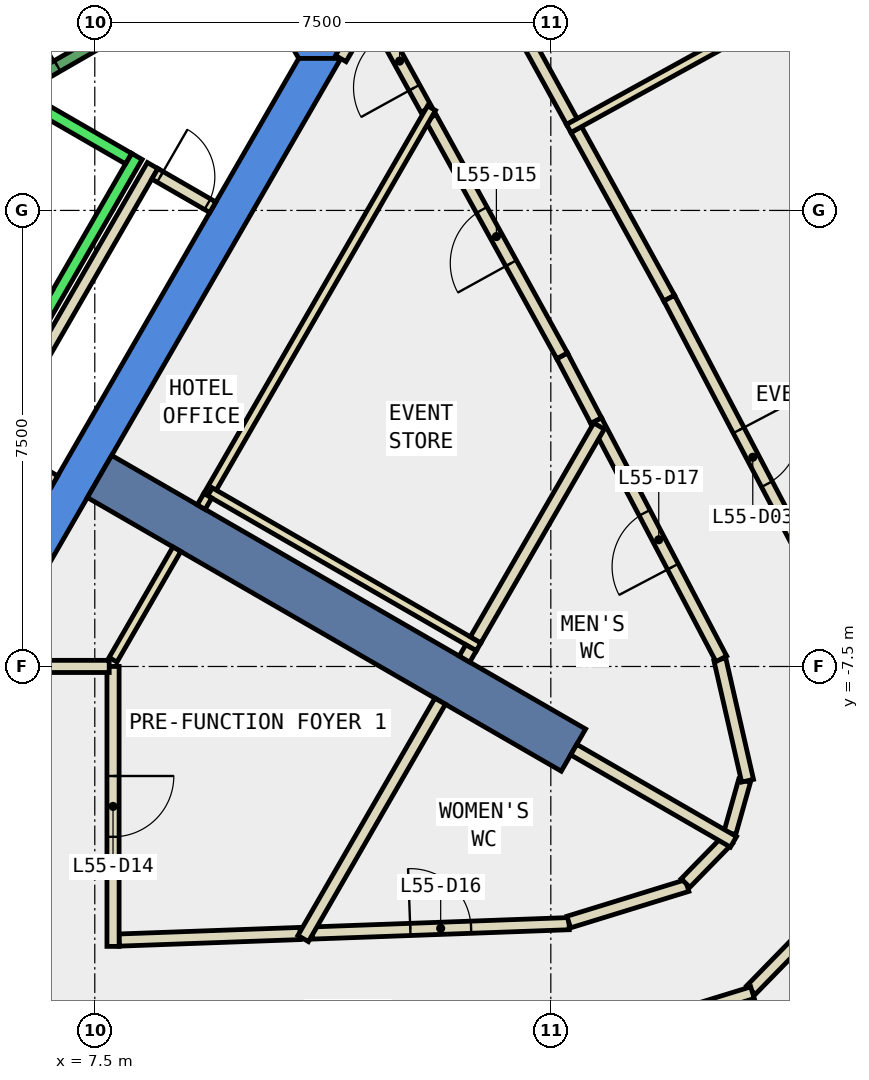
"""IFC4 building model, lengths in metres.
Left out: names, types, materials, properties, quantities, classifications, styles, units other than length and angle.
Written with IfcOpenShell. Run it as: python <this file> out.ifc"""

import sys

from ifc_helpers import new_model, si_unit, direction, frame, frame_2d, origin, place, context, subcontext, project, spatial, polyline, rectangle, outline, extrude, element, fill, save


model = new_model("IFC4")
c1 = context("Model", 3, precision=1e-05, world=origin(), true_north=direction((0.0, 1.0)))
c2 = subcontext(c1, "Body", "Model", "MODEL_VIEW")
j1 = project(units=[si_unit("LENGTHUNIT", "METRE"), si_unit("PLANEANGLEUNIT", "RADIAN")], contexts=[c1])
p1 = place(None, origin())
s1 = spatial("IfcSite", under=j1, at=p1, CompositionType="ELEMENT")
p2 = place(p1, origin())
s2 = spatial("IfcBuilding", under=s1, at=p2, CompositionType="ELEMENT")
p3 = place(p2, frame((0.0, 0.0, 245.0)))
s3 = spatial("IfcBuildingStorey", under=s2, at=p3, CompositionType="ELEMENT", Elevation=245.0)
p4 = place(p3, frame((0.0, 0.0, -0.34)))
e1 = element("IfcWall", 1, at=p4, inside=s3, PredefinedType="SHEAR", context=c2, shape_type="SweptSolid", body=[
    extrude(outline(polyline([(6.786, 10.747), (6.266, 10.447), (10.854, 2.5), (11.547, 2.5), (6.786, 10.747)])), origin(), (0.0, 0.0, 1.0), 3.6),
])
p5 = place(p3, frame((0.0, 0.0, -0.34)))
e2 = element("IfcWall", 2, at=p5, inside=s3, PredefinedType="SHEAR", context=c2, shape_type="SweptSolid", body=[
    extrude(outline(polyline([(5.774, -7.5), (11.547, 2.5), (10.854, 2.5), (5.427, -6.9), (5.774, -7.5)])), origin(), (0.0, 0.0, 1.0), 3.6),
])
p6 = place(p3, frame((7.578, -4.375, -0.34), z_axis=(0.0, 0.0, 1.0), x_axis=(0.866024315419, -0.5000018851, 0.0)))
e3 = element("IfcWall", 3, at=p6, inside=s3, PredefinedType="SHEAR", context=c2, shape_type="SweptSolid", body=[
    extrude(rectangle(XDim=9.0, YDim=0.8, at=frame_2d((4.5, 0.0))), origin(), (0.0, 0.0, 1.0), 3.6),
])
p7 = place(p3, frame((21.505, 1.577, 0.0), z_axis=(0.0, 0.0, 1.0), x_axis=(-0.482734585173, 0.875766704253, 0.0)))
e4 = element("IfcWall", 4, at=p7, inside=s3, PredefinedType="STANDARD", context=c2, shape_type="SweptSolid", body=[
    extrude(rectangle(XDim=5.593, YDim=0.3, at=frame_2d((2.796, 0.0))), origin(), (0.0, 0.0, 1.0), 3.26),
])
p8 = place(p7, frame((0.698, 0.0, 0.9)))
e5 = element("IfcOpeningElement", 5, at=p8, cuts=e4, PredefinedType="OPENING", context=c2, shape_type="SweptSolid", body=[
    extrude(rectangle(XDim=1.4, YDim=2.0, at=frame_2d((0.7, 1.0))), frame((0.0, 0.16, 0.0), z_axis=(0.0, -1.0, 0.0), x_axis=(1.0, 0.0, 0.0)), (0.0, 0.0, 1.0), 0.32),
])
p9 = place(p7, frame((3.495, 0.0, 0.9)))
e6 = element("IfcOpeningElement", 6, at=p9, cuts=e4, PredefinedType="OPENING", context=c2, shape_type="SweptSolid", body=[
    extrude(rectangle(XDim=1.4, YDim=2.0, at=frame_2d((0.7, 1.0))), frame((0.0, 0.16, 0.0), z_axis=(0.0, -1.0, 0.0), x_axis=(1.0, 0.0, 0.0)), (0.0, 0.0, 1.0), 0.32),
])
p10 = place(p3, frame((12.952, 1.661, 0.0), z_axis=(0.0, 0.0, 1.0), x_axis=(-0.482707835392, 0.875781448566, 0.0)))
e7 = element("IfcWall", 7, at=p10, inside=s3, PredefinedType="PARTITIONING", context=c2, shape_type="SweptSolid", body=[
    extrude(rectangle(XDim=1.817, YDim=0.2, at=frame_2d((0.908, 0.0))), origin(), (0.0, 0.0, 1.0), 3.26),
])
p11 = place(p10, frame((0.408, 0.0, 0.0)))
e8 = element("IfcOpeningElement", 8, at=p11, cuts=e7, PredefinedType="OPENING", context=c2, shape_type="SweptSolid", body=[
    extrude(rectangle(XDim=1.0, YDim=2.1, at=frame_2d((0.5, 1.05))), frame((0.0, 0.11, 0.0), z_axis=(0.0, -1.0, 0.0), x_axis=(1.0, 0.0, 0.0)), (0.0, 0.0, 1.0), 0.22),
])
p12 = place(p3, frame((12.079, 3.419, 0.0), z_axis=(0.0, 0.0, 1.0), x_axis=(-0.500674759037, -0.865635480825, 0.0)))
e9 = element("IfcWall", 9, at=p12, inside=s3, PredefinedType="PARTITIONING", context=c2, shape_type="SweptSolid", body=[
    extrude(rectangle(XDim=1.065, YDim=0.2, at=frame_2d((0.532, 0.0))), origin(), (0.0, 0.0, 1.0), 3.26),
])
p13 = place(p3, frame((7.9, -11.999, 0.0), z_axis=(0.0, 0.0, 1.0), x_axis=(0.999343711998, 0.036223546064, 0.0)))
e10 = element("IfcWall", 10, at=p13, inside=s3, PredefinedType="PARTITIONING", context=c2, shape_type="SweptSolid", body=[
    extrude(rectangle(XDim=2.979, YDim=0.2, at=frame_2d((1.49, 0.0))), origin(), (0.0, 0.0, 1.0), 3.26),
])
p14 = place(p3, frame((15.746, -3.458, 0.0), z_axis=(0.0, 0.0, 1.0), x_axis=(-0.464794189951, 0.885418748948, 0.0)))
e11 = element("IfcWall", 11, at=p14, inside=s3, PredefinedType="PARTITIONING", context=c2, shape_type="SweptSolid", body=[
    extrude(rectangle(XDim=1.205, YDim=0.2, at=frame_2d((0.603, 0.0))), origin(), (0.0, 0.0, 1.0), 3.26),
])
p15 = place(p3, frame((15.186, -2.391, 0.0), z_axis=(0.0, 0.0, 1.0), x_axis=(-0.482858240592, 0.875698532311, 0.0)))
e12 = element("IfcWall", 12, at=p15, inside=s3, PredefinedType="PARTITIONING", context=c2, shape_type="SweptSolid", body=[
    extrude(rectangle(XDim=4.478, YDim=0.2, at=frame_2d((2.239, 0.0))), origin(), (0.0, 0.0, 1.0), 3.26),
])
p16 = place(p15, frame((1.739, 0.0, 0.0)))
e13 = element("IfcOpeningElement", 13, at=p16, cuts=e12, PredefinedType="OPENING", context=c2, shape_type="SweptSolid", body=[
    extrude(rectangle(XDim=1.0, YDim=2.1, at=frame_2d((0.5, 1.05))), frame((0.0, 0.11, 0.0), z_axis=(0.0, -1.0, 0.0), x_axis=(1.0, 0.0, 0.0)), (0.0, 0.0, 1.0), 0.22),
])
p17 = place(p3, frame((11.077, -11.883, 0.0), z_axis=(0.0, 0.0, 1.0), x_axis=(0.999335333519, 0.036453959732, 0.0)))
e14 = element("IfcWall", 14, at=p17, inside=s3, PredefinedType="PARTITIONING", context=c2, shape_type="SweptSolid", body=[
    extrude(rectangle(XDim=4.226, YDim=0.2, at=frame_2d((2.113, 0.0))), origin(), (0.0, 0.0, 1.0), 3.26),
])
p18 = place(p17, frame((1.613, 0.0, 0.0)))
e15 = element("IfcOpeningElement", 15, at=p18, cuts=e14, PredefinedType="OPENING", context=c2, shape_type="SweptSolid", body=[
    extrude(rectangle(XDim=1.0, YDim=2.1, at=frame_2d((0.5, 1.05))), frame((0.0, 0.11, 0.0), z_axis=(0.0, -1.0, 0.0), x_axis=(1.0, 0.0, 0.0)), (0.0, 0.0, 1.0), 0.22),
])
p19 = place(p3, frame((15.295, -11.703, 0.0), z_axis=(0.0, 0.0, 1.0), x_axis=(0.95563113363, 0.294566013716, 0.0)))
e16 = element("IfcWall", 16, at=p19, inside=s3, PredefinedType="PARTITIONING", context=c2, shape_type="SweptSolid", body=[
    extrude(rectangle(XDim=2.036, YDim=0.2, at=frame_2d((1.018, 0.0))), origin(), (0.0, 0.0, 1.0), 3.26),
])
p20 = place(p3, frame((17.215, -11.061, 0.0), z_axis=(0.0, 0.0, 1.0), x_axis=(0.698527813511, 0.715582904877, 0.0)))
e17 = element("IfcWall", 17, at=p20, inside=s3, PredefinedType="PARTITIONING", context=c2, shape_type="SweptSolid", body=[
    extrude(rectangle(XDim=1.002, YDim=0.2, at=frame_2d((0.501, 0.0))), origin(), (0.0, 0.0, 1.0), 3.26),
])
p21 = place(p3, frame((17.945, -10.238, 0.0), z_axis=(0.0, 0.0, 1.0), x_axis=(0.270785141481, 0.962639811743, 0.0)))
e18 = element("IfcWall", 18, at=p21, inside=s3, PredefinedType="PARTITIONING", context=c2, shape_type="SweptSolid", body=[
    extrude(rectangle(XDim=0.894, YDim=0.2, at=frame_2d((0.447, 0.0))), origin(), (0.0, 0.0, 1.0), 3.26),
])
p22 = place(p3, frame((18.236, -9.379, 0.0), z_axis=(0.0, 0.0, 1.0), x_axis=(-0.222760041204, 0.974873306662, 0.0)))
e19 = element("IfcWall", 19, at=p22, inside=s3, PredefinedType="PARTITIONING", context=c2, shape_type="SweptSolid", body=[
    extrude(rectangle(XDim=2.047, YDim=0.2, at=frame_2d((1.024, 0.0))), origin(), (0.0, 0.0, 1.0), 3.26),
])
p23 = place(p3, frame((17.804, -7.374, 0.0), z_axis=(0.0, 0.0, 1.0), x_axis=(-0.465179971699, 0.885216128372, 0.0)))
e20 = element("IfcWall", 20, at=p23, inside=s3, PredefinedType="PARTITIONING", context=c2, shape_type="SweptSolid", body=[
    extrude(rectangle(XDim=4.424, YDim=0.2, at=frame_2d((2.212, 0.0))), origin(), (0.0, 0.0, 1.0), 3.26),
])
p24 = place(p23, frame((1.712, 0.0, 0.0)))
e21 = element("IfcOpeningElement", 21, at=p24, cuts=e20, PredefinedType="OPENING", context=c2, shape_type="SweptSolid", body=[
    extrude(rectangle(XDim=1.0, YDim=2.1, at=frame_2d((0.5, 1.05))), frame((0.0, 0.11, 0.0), z_axis=(0.0, -1.0, 0.0), x_axis=(1.0, 0.0, 0.0)), (0.0, 0.0, 1.0), 0.22),
])
p25 = place(p3, frame((19.633, -11.447, 0.0), z_axis=(0.0, 0.0, 1.0), x_axis=(-0.698477855606, -0.715631668687, 0.0)))
e22 = element("IfcWall", 22, at=p25, inside=s3, PredefinedType="PARTITIONING", context=c2, shape_type="SweptSolid", body=[
    extrude(rectangle(XDim=1.921, YDim=0.2, at=frame_2d((0.961, 0.0))), origin(), (0.0, 0.0, 1.0), 3.26),
])
p26 = place(p3, frame((18.317, -12.864, 0.0), z_axis=(0.0, 0.0, 1.0), x_axis=(-0.955600342663, -0.294665887239, 0.0)))
e23 = element("IfcWall", 23, at=p26, inside=s3, PredefinedType="PARTITIONING", context=c2, shape_type="SweptSolid", body=[
    extrude(rectangle(XDim=2.81, YDim=0.2, at=frame_2d((1.405, 0.0))), origin(), (0.0, 0.0, 1.0), 3.26),
])
p27 = place(p3, frame((15.418, 1.33, 0.0), z_axis=(0.0, 0.0, 1.0), x_axis=(0.482838875149, -0.875709210095, 0.0)))
e24 = element("IfcWall", 24, at=p27, inside=s3, PredefinedType="PARTITIONING", context=c2, shape_type="SweptSolid", body=[
    extrude(rectangle(XDim=3.167, YDim=0.2, at=frame_2d((1.583, 0.0))), origin(), (0.0, 0.0, 1.0), 3.26),
])
p28 = place(p3, frame((16.947, -1.443, 0.0), z_axis=(0.0, 0.0, 1.0), x_axis=(0.465133414481, -0.88524059257, 0.0)))
e25 = element("IfcWall", 25, at=p28, inside=s3, PredefinedType="PARTITIONING", context=c2, shape_type="SweptSolid", body=[
    extrude(rectangle(XDim=5.91, YDim=0.2, at=frame_2d((2.955, 0.0))), origin(), (0.0, 0.0, 1.0), 3.26),
])
p29 = place(p28, frame((2.455, 0.0, 0.0)))
e26 = element("IfcOpeningElement", 26, at=p29, cuts=e25, PredefinedType="OPENING", context=c2, shape_type="SweptSolid", body=[
    extrude(rectangle(XDim=1.0, YDim=2.1, at=frame_2d((0.5, 1.05))), frame((0.0, 0.11, 0.0), z_axis=(0.0, -1.0, 0.0), x_axis=(1.0, 0.0, 0.0)), (0.0, 0.0, 1.0), 0.22),
])
p30 = place(p3, frame((13.817, 4.234, 0.0), z_axis=(0.0, 0.0, 1.0), x_axis=(0.482871474341, -0.875691235121, 0.0)))
e27 = element("IfcWall", 27, at=p30, inside=s3, PredefinedType="PARTITIONING", context=c2, shape_type="SweptSolid", body=[
    extrude(rectangle(XDim=3.167, YDim=0.2, at=frame_2d((1.583, 0.0))), origin(), (0.0, 0.0, 1.0), 3.26),
])
p31 = place(p3, frame((5.751, -3.938, 0.0), z_axis=(0.0, 0.0, 1.0), x_axis=(0.500034260056, 0.866005622828, 0.0)))
e28 = element("IfcWall", 28, at=p31, inside=s3, PredefinedType="PARTITIONING", context=c2, shape_type="SweptSolid", body=[
    extrude(rectangle(XDim=5.399, YDim=0.2, at=frame_2d((2.7, 0.0))), origin(), (0.0, 0.0, 1.0), 3.26),
])
p32 = place(p3, frame((8.488, 0.602, 0.0), z_axis=(0.0, 0.0, 1.0), x_axis=(0.866063652425, -0.499933745558, 0.0)))
e29 = element("IfcWall", 29, at=p32, inside=s3, PredefinedType="PARTITIONING", context=c2, shape_type="SweptSolid", body=[
    extrude(rectangle(XDim=1.1, YDim=0.2, at=frame_2d((0.55, 0.0))), origin(), (0.0, 0.0, 1.0), 3.26),
])
p33 = place(p32, frame((0.1, 0.0, 0.0)))
e30 = element("IfcOpeningElement", 30, at=p33, cuts=e29, PredefinedType="OPENING", context=c2, shape_type="SweptSolid", body=[
    extrude(rectangle(XDim=0.9, YDim=2.1, at=frame_2d((0.45, 1.05))), frame((0.0, 0.11, 0.0), z_axis=(0.0, -1.0, 0.0), x_axis=(1.0, 0.0, 0.0)), (0.0, 0.0, 1.0), 0.22),
])
p34 = place(p3, frame((6.841, -4.452, 0.0), z_axis=(0.0, 0.0, 1.0), x_axis=(-0.86621513555, 0.499671230855, 0.0)))
e31 = element("IfcWall", 31, at=p34, inside=s3, PredefinedType="PARTITIONING", context=c2, shape_type="SweptSolid", body=[
    extrude(rectangle(XDim=1.1, YDim=0.2, at=frame_2d((0.55, 0.0))), origin(), (0.0, 0.0, 1.0), 3.26),
])
p35 = place(p3, frame((7.8, -7.39, 0.0), z_axis=(0.0, 0.0, 1.0), x_axis=(0.499977374825, 0.866038466041, 0.0)))
e32 = element("IfcWall", 32, at=p35, inside=s3, PredefinedType="PARTITIONING", context=c2, shape_type="SweptSolid", body=[
    extrude(rectangle(XDim=2.1, YDim=0.15, at=frame_2d((1.05, 0.0))), origin(), (0.0, 0.0, 1.0), 3.26),
])
p36 = place(p3, frame((9.358, -4.692, 0.0), z_axis=(0.0, 0.0, 1.0), x_axis=(0.500027777314, 0.866009365951, 0.0)))
e33 = element("IfcWall", 33, at=p36, inside=s3, PredefinedType="PARTITIONING", context=c2, shape_type="SweptSolid", body=[
    extrude(rectangle(XDim=7.36, YDim=0.15, at=frame_2d((3.68, 0.0))), origin(), (0.0, 0.0, 1.0), 3.26),
])
p37 = place(p3, frame((7.8, -7.499, 0.0), z_axis=(0.0, 0.0, 1.0), x_axis=(0.0, -1.0, 0.0)))
e34 = element("IfcWall", 34, at=p37, inside=s3, PredefinedType="PARTITIONING", context=c2, shape_type="SweptSolid", body=[
    extrude(rectangle(XDim=4.604, YDim=0.2, at=frame_2d((2.302, 0.0))), origin(), (0.0, 0.0, 1.0), 3.26),
])
p38 = place(p37, frame((1.802, 0.0, 0.0)))
e35 = element("IfcOpeningElement", 35, at=p38, cuts=e34, PredefinedType="OPENING", context=c2, shape_type="SweptSolid", body=[
    extrude(rectangle(XDim=1.0, YDim=2.1, at=frame_2d((0.5, 1.05))), frame((0.0, 0.11, 0.0), z_axis=(0.0, -1.0, 0.0), x_axis=(1.0, 0.0, 0.0)), (0.0, 0.0, 1.0), 0.22),
])
p39 = place(p3, frame((9.395, -4.627, 0.0), z_axis=(0.0, 0.0, 1.0), x_axis=(0.866034131428, -0.499984882974, 0.0)))
e36 = element("IfcWall", 36, at=p39, inside=s3, PredefinedType="PARTITIONING", context=c2, shape_type="SweptSolid", body=[
    extrude(rectangle(XDim=5.1, YDim=0.15, at=frame_2d((2.55, 0.0))), origin(), (0.0, 0.0, 1.0), 3.26),
])
p40 = place(p3, frame((13.18, -8.071, 0.0), z_axis=(0.0, 0.0, 1.0), x_axis=(-0.499914724673, -0.86607463192, 0.0)))
e37 = element("IfcWall", 37, at=p40, inside=s3, PredefinedType="PARTITIONING", context=c2, shape_type="SweptSolid", body=[
    extrude(rectangle(XDim=4.507, YDim=0.2, at=frame_2d((2.253, 0.0))), origin(), (0.0, 0.0, 1.0), 3.26),
])
p41 = place(p3, frame((13.688, -7.192, 0.0), z_axis=(0.0, 0.0, 1.0), x_axis=(-0.499787711288, -0.866147934042, 0.0)))
e38 = element("IfcWall", 38, at=p41, inside=s3, PredefinedType="PARTITIONING", context=c2, shape_type="SweptSolid", body=[
    extrude(rectangle(XDim=0.216, YDim=0.2, at=frame_2d((0.108, 0.0))), origin(), (0.0, 0.0, 1.0), 3.26),
])
p42 = place(p3, frame((15.793, -3.546, 0.0), z_axis=(0.0, 0.0, 1.0), x_axis=(-0.500000064182, -0.866025366729, 0.0)))
e39 = element("IfcWall", 39, at=p42, inside=s3, PredefinedType="PARTITIONING", context=c2, shape_type="SweptSolid", body=[
    extrude(rectangle(XDim=4.06, YDim=0.2, at=frame_2d((2.03, 0.0))), origin(), (0.0, 0.0, 1.0), 3.26),
])
p43 = place(p3, frame((15.377, -8.867, 0.0), z_axis=(0.0, 0.0, 1.0), x_axis=(0.865965767548, -0.500103278768, 0.0)))
e40 = element("IfcWall", 40, at=p43, inside=s3, PredefinedType="PARTITIONING", context=c2, shape_type="SweptSolid", body=[
    extrude(rectangle(XDim=3.033, YDim=0.2, at=frame_2d((1.517, 0.0))), origin(), (0.0, 0.0, 1.0), 3.26),
])
p44 = place(p3, frame((15.295, 1.347, 0.0), z_axis=(0.0, 0.0, 1.0), x_axis=(0.875728645362, 0.482803624358, 0.0)))
e41 = element("IfcWall", 41, at=p44, inside=s3, PredefinedType="PARTITIONING", context=c2, shape_type="SweptSolid", body=[
    extrude(rectangle(XDim=5.4, YDim=0.15, at=frame_2d((2.7, 0.0))), origin(), (0.0, 0.0, 1.0), 3.26),
])
p45 = place(p3, frame((9.25, -4.879, 0.0), z_axis=(0.0, 0.0, 1.0), x_axis=(0.499787711288, 0.866147934042, 0.0)))
e42 = element("IfcWall", 42, at=p45, inside=s3, PredefinedType="PARTITIONING", context=c2, shape_type="SweptSolid", body=[
    extrude(rectangle(XDim=0.216, YDim=0.15, at=frame_2d((0.108, 0.0))), origin(), (0.0, 0.0, 1.0), 3.26),
])
p46 = place(p3, frame((5.944, -7.499, 0.0), z_axis=(0.0, 0.0, 1.0), x_axis=(1.0, 0.0, 0.0)))
e43 = element("IfcWall", 43, at=p46, inside=s3, PredefinedType="PARTITIONING", context=c2, shape_type="SweptSolid", body=[
    extrude(rectangle(XDim=1.793, YDim=0.2, at=frame_2d((0.896, 0.0))), origin(), (0.0, 0.0, 1.0), 3.26),
])
p47 = place(p3, frame((5.492, -3.788, 0.0), z_axis=(0.0, 0.0, 1.0), x_axis=(0.500034260056, 0.866005622828, 0.0)))
e44 = element("IfcWall", 44, at=p47, inside=s3, PredefinedType="STANDARD", context=c2, shape_type="SweptSolid", body=[
    extrude(rectangle(XDim=5.399, YDim=0.2, at=frame_2d((2.7, 0.0))), origin(), (0.0, 0.0, 1.0), 3.26),
])
for number, where, z_axis, x_axis in (
    (45, (4.677, -0.2, 0.0), (0.0, 0.0, 1.0), (0.866, -0.5, 0.0)),
    (46, (5.977, 2.052, 0.0), (0.0, 0.0, 1.0), (0.866, -0.5, 0.0)),
):
    element("IfcWall", number, at=place(p3, frame(where, z_axis=z_axis, x_axis=x_axis)), inside=s3, PredefinedType="STANDARD", context=c2, shape_type="SweptSolid", body=[
        extrude(rectangle(XDim=2.399, YDim=0.2, at=frame_2d((1.2, 0.0))), origin(), (0.0, 0.0, 1.0), 3.26),
    ])
p48 = place(p3, frame((4.806, 1.176, 0.0), z_axis=(0.0, 0.0, 1.0), x_axis=(0.866059941101, 0.499940174841, 0.0)))
e47 = element("IfcWall", 47, at=p48, inside=s3, PredefinedType="STANDARD", context=c2, shape_type="SweptSolid", body=[
    extrude(rectangle(XDim=4.4, YDim=0.2, at=frame_2d((2.2, 0.0))), origin(), (0.0, 0.0, 1.0), 3.26),
])
p49 = place(p48, frame((2.4, 0.0, 0.0)))
e48 = element("IfcOpeningElement", 48, at=p49, cuts=e47, PredefinedType="OPENING", context=c2, shape_type="SweptSolid", body=[
    extrude(rectangle(XDim=1.1, YDim=2.2, at=frame_2d((0.55, 1.1))), frame((0.0, 0.11, 0.0), z_axis=(0.0, -1.0, 0.0), x_axis=(1.0, 0.0, 0.0)), (0.0, 0.0, 1.0), 0.22),
])
p50 = place(p29, origin())
e49 = element("IfcDoor", 49, at=p50, inside=s3, OperationType="SINGLE_SWING_LEFT", PredefinedType="DOOR", context=c2, shape_type="SweptSolid", body=[
    extrude(rectangle(XDim=1.0, YDim=2.1, at=frame_2d((0.5, 1.05))), frame((0.0, 0.025, 0.0), z_axis=(0.0, -1.0, 0.0), x_axis=(1.0, 0.0, 0.0)), (0.0, 0.0, 1.0), 0.05),
])
fill(e26, e49)
p51 = place(p38, origin())
e50 = element("IfcDoor", 50, at=p51, inside=s3, OperationType="SINGLE_SWING_LEFT", PredefinedType="DOOR", context=c2, shape_type="SweptSolid", body=[
    extrude(rectangle(XDim=1.0, YDim=2.1, at=frame_2d((0.5, 1.05))), frame((0.0, 0.025, 0.0), z_axis=(0.0, -1.0, 0.0), x_axis=(1.0, 0.0, 0.0)), (0.0, 0.0, 1.0), 0.05),
])
fill(e35, e50)
p52 = place(p16, origin())
e51 = element("IfcDoor", 51, at=p52, inside=s3, OperationType="SINGLE_SWING_LEFT", PredefinedType="DOOR", context=c2, shape_type="SweptSolid", body=[
    extrude(rectangle(XDim=1.0, YDim=2.1, at=frame_2d((0.5, 1.05))), frame((0.0, 0.025, 0.0), z_axis=(0.0, -1.0, 0.0), x_axis=(1.0, 0.0, 0.0)), (0.0, 0.0, 1.0), 0.05),
])
fill(e13, e51)
p53 = place(p18, origin())
e52 = element("IfcDoor", 52, at=p53, inside=s3, OperationType="SINGLE_SWING_LEFT", PredefinedType="DOOR", context=c2, shape_type="SweptSolid", body=[
    extrude(rectangle(XDim=1.0, YDim=2.1, at=frame_2d((0.5, 1.05))), frame((0.0, 0.025, 0.0), z_axis=(0.0, -1.0, 0.0), x_axis=(1.0, 0.0, 0.0)), (0.0, 0.0, 1.0), 0.05),
])
fill(e15, e52)
p54 = place(p24, origin())
e53 = element("IfcDoor", 53, at=p54, inside=s3, OperationType="SINGLE_SWING_LEFT", PredefinedType="DOOR", context=c2, shape_type="SweptSolid", body=[
    extrude(rectangle(XDim=1.0, YDim=2.1, at=frame_2d((0.5, 1.05))), frame((0.0, 0.025, 0.0), z_axis=(0.0, -1.0, 0.0), x_axis=(1.0, 0.0, 0.0)), (0.0, 0.0, 1.0), 0.05),
])
fill(e21, e53)
p55 = place(p11, origin())
e54 = element("IfcDoor", 54, at=p55, inside=s3, OperationType="SINGLE_SWING_RIGHT", PredefinedType="DOOR", context=c2, shape_type="SweptSolid", body=[
    extrude(rectangle(XDim=1.0, YDim=2.1, at=frame_2d((0.5, 1.05))), frame((0.0, 0.025, 0.0), z_axis=(0.0, -1.0, 0.0), x_axis=(1.0, 0.0, 0.0)), (0.0, 0.0, 1.0), 0.05),
])
fill(e8, e54)
p56 = place(p33, origin())
e55 = element("IfcDoor", 55, at=p56, inside=s3, OperationType="SINGLE_SWING_RIGHT", PredefinedType="DOOR", context=c2, shape_type="SweptSolid", body=[
    extrude(rectangle(XDim=0.9, YDim=2.1, at=frame_2d((0.45, 1.05))), frame((0.0, 0.025, 0.0), z_axis=(0.0, -1.0, 0.0), x_axis=(1.0, 0.0, 0.0)), (0.0, 0.0, 1.0), 0.05),
])
fill(e30, e55)
p57 = place(p49, origin())
e56 = element("IfcDoor", 56, at=p57, inside=s3, OperationType="SINGLE_SWING_LEFT", PredefinedType="DOOR", context=c2, shape_type="SweptSolid", body=[
    extrude(rectangle(XDim=1.1, YDim=2.2, at=frame_2d((0.55, 1.1))), frame((0.0, 0.025, 0.0), z_axis=(0.0, -1.0, 0.0), x_axis=(1.0, 0.0, 0.0)), (0.0, 0.0, 1.0), 0.05),
])
fill(e48, e56)
save(model, sys.argv[1])
